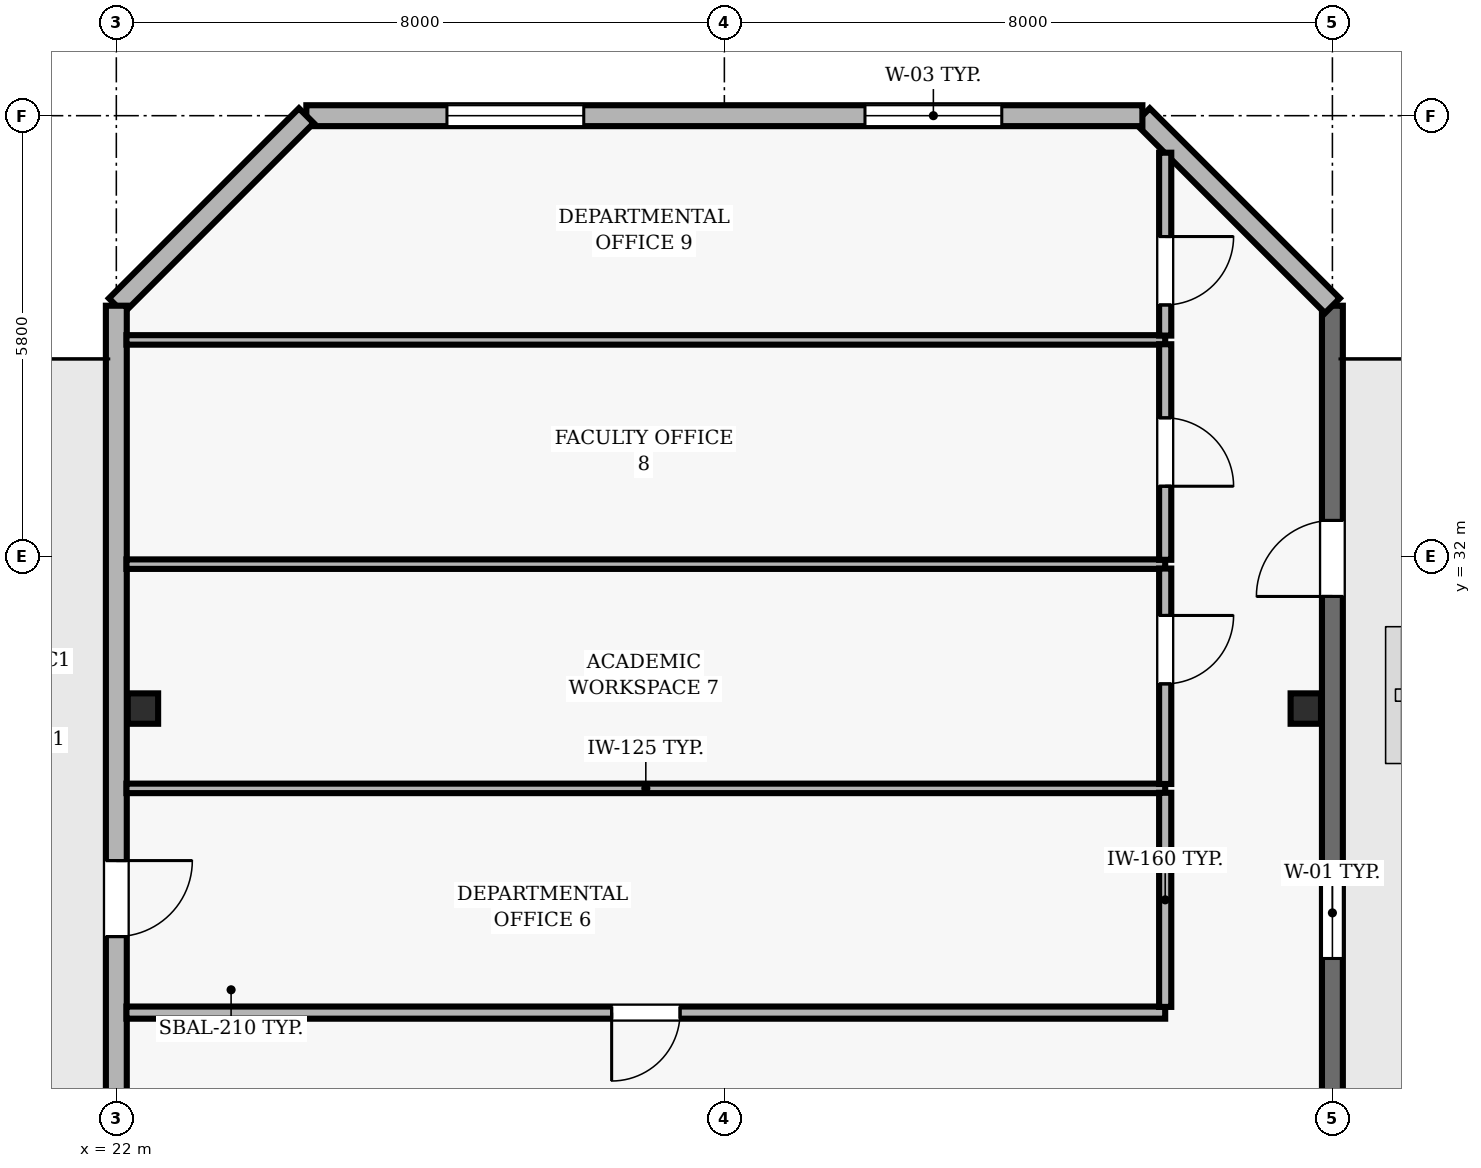
"""IFC4 building model, lengths in metres.
Left out: names, types, materials, properties, quantities, classifications, styles, units other than length and angle.
Written with IfcOpenShell. Run it as: python <this file> out.ifc"""

import sys

from ifc_helpers import new_model, si_unit, direction, frame, frame_2d, origin, origin_2d, place, context, subcontext, project, spatial, rectangle, hollow_rectangle, extrude, element, fill, save


model = new_model("IFC4")
c1 = context("Model", 3, precision=1e-05, world=origin(), true_north=direction((0.0, 1.0)))
c2 = subcontext(c1, "Body", "Model", "MODEL_VIEW")
j1 = project(units=[si_unit("LENGTHUNIT", "METRE"), si_unit("PLANEANGLEUNIT", "RADIAN")], contexts=[c1])
p1 = place(None, origin())
s1 = spatial("IfcSite", under=j1, at=p1, CompositionType="ELEMENT")
p2 = place(p1, origin())
s2 = spatial("IfcBuilding", under=s1, at=p2, CompositionType="ELEMENT")
p3 = place(p2, frame((0.0, 0.0, 263.8)))
s3 = spatial("IfcBuildingStorey", under=s2, at=p3, CompositionType="ELEMENT", Elevation=263.8)
for number, where, z_axis, x_axis in (
    (1, (22.35, 30.0, 0.0), (0.0, 0.0, 1.0), (1.0, 0.0, 0.0)),
    (2, (37.65, 30.0, 0.0), (0.0, 0.0, 1.0), (1.0, 0.0, 0.0)),
):
    element("IfcColumn", number, at=place(p3, frame(where, z_axis=z_axis, x_axis=x_axis)), inside=s3, PredefinedType="COLUMN", context=c2, shape_type="SweptSolid", body=[
        extrude(hollow_rectangle(XDim=0.4, YDim=0.4, WallThickness=0.02, at=origin_2d()), origin(), (0.0, 0.0, 1.0), 3.9),
    ])
p4 = place(p3, frame((38.0, 24.05, 0.0), z_axis=(0.0, 0.0, 1.0), x_axis=(0.0, 1.0, 0.0)))
e3 = element("IfcWall", 3, at=p4, inside=s3, PredefinedType="SOLIDWALL", context=c2, shape_type="SweptSolid", body=[
    extrude(rectangle(XDim=11.25, YDim=0.275, at=frame_2d((5.625, 0.0))), origin(), (0.0, 0.0, 1.0), 3.69),
])
p5 = place(p4, frame((7.425, 0.0, 0.0)))
e4 = element("IfcOpeningElement", 4, at=p5, cuts=e3, PredefinedType="OPENING", context=c2, shape_type="SweptSolid", body=[
    extrude(rectangle(XDim=1.0, YDim=2.2, at=frame_2d((0.5, 1.1))), frame((0.0, 0.147, 0.0), z_axis=(0.0, -1.0, 0.0), x_axis=(1.0, 0.0, 0.0)), (0.0, 0.0, 1.0), 0.295),
])
p6 = place(p4, frame((2.662, 0.0, 0.9)))
e5 = element("IfcOpeningElement", 5, at=p6, cuts=e3, PredefinedType="OPENING", context=c2, shape_type="SweptSolid", body=[
    extrude(rectangle(XDim=1.2, YDim=1.6, at=frame_2d((0.6, 0.8))), frame((0.0, 0.147, 0.0), z_axis=(0.0, -1.0, 0.0), x_axis=(1.0, 0.0, 0.0)), (0.0, 0.0, 1.0), 0.295),
])
p7 = place(p3, frame((38.0, 35.3, 0.0), z_axis=(0.0, 0.0, 1.0), x_axis=(-0.707106781187, 0.707106781187, 0.0)))
e6 = element("IfcWall", 6, at=p7, inside=s3, PredefinedType="SOLIDWALL", context=c2, shape_type="SweptSolid", body=[
    extrude(rectangle(XDim=3.536, YDim=0.275, at=frame_2d((1.768, 0.0))), origin(), (0.0, 0.0, 1.0), 3.69),
])
p8 = place(p3, frame((35.5, 37.8, 0.0), z_axis=(0.0, 0.0, 1.0), x_axis=(-1.0, 0.0, 0.0)))
e7 = element("IfcWall", 7, at=p8, inside=s3, PredefinedType="SOLIDWALL", context=c2, shape_type="SweptSolid", body=[
    extrude(rectangle(XDim=11.0, YDim=0.275, at=frame_2d((5.5, 0.0))), origin(), (0.0, 0.0, 1.0), 3.69),
])
p9 = place(p8, frame((1.85, 0.0, 0.9)))
e8 = element("IfcOpeningElement", 8, at=p9, cuts=e7, PredefinedType="OPENING", context=c2, shape_type="SweptSolid", body=[
    extrude(rectangle(XDim=1.8, YDim=1.6, at=frame_2d((0.9, 0.8))), frame((0.0, 0.147, 0.0), z_axis=(0.0, -1.0, 0.0), x_axis=(1.0, 0.0, 0.0)), (0.0, 0.0, 1.0), 0.295),
])
p10 = place(p8, frame((7.35, 0.0, 0.9)))
e9 = element("IfcOpeningElement", 9, at=p10, cuts=e7, PredefinedType="OPENING", context=c2, shape_type="SweptSolid", body=[
    extrude(rectangle(XDim=1.8, YDim=1.6, at=frame_2d((0.9, 0.8))), frame((0.0, 0.147, 0.0), z_axis=(0.0, -1.0, 0.0), x_axis=(1.0, 0.0, 0.0)), (0.0, 0.0, 1.0), 0.295),
])
p11 = place(p3, frame((24.5, 37.8, 0.0), z_axis=(0.0, 0.0, 1.0), x_axis=(-0.707106781187, -0.707106781187, 0.0)))
e10 = element("IfcWall", 10, at=p11, inside=s3, PredefinedType="SOLIDWALL", context=c2, shape_type="SweptSolid", body=[
    extrude(rectangle(XDim=3.536, YDim=0.275, at=frame_2d((1.768, 0.0))), origin(), (0.0, 0.0, 1.0), 3.69),
])
p12 = place(p3, frame((22.0, 35.3, 0.0), z_axis=(0.0, 0.0, 1.0), x_axis=(0.0, -1.0, 0.0)))
e11 = element("IfcWall", 11, at=p12, inside=s3, PredefinedType="SOLIDWALL", context=c2, shape_type="SweptSolid", body=[
    extrude(rectangle(XDim=32.8, YDim=0.275, at=frame_2d((16.4, 0.0))), origin(), (0.0, 0.0, 1.0), 3.69),
])
p13 = place(p12, frame((7.3, 0.0, 0.0)))
e12 = element("IfcOpeningElement", 12, at=p13, cuts=e11, PredefinedType="OPENING", context=c2, shape_type="SweptSolid", body=[
    extrude(rectangle(XDim=1.0, YDim=2.2, at=frame_2d((0.5, 1.1))), frame((0.0, 0.147, 0.0), z_axis=(0.0, -1.0, 0.0), x_axis=(1.0, 0.0, 0.0)), (0.0, 0.0, 1.0), 0.295),
])
p14 = place(p12, frame((12.917, 0.0, 0.9)))
e13 = element("IfcOpeningElement", 13, at=p14, cuts=e11, PredefinedType="OPENING", context=c2, shape_type="SweptSolid", body=[
    extrude(rectangle(XDim=2.4, YDim=1.6, at=frame_2d((1.2, 0.8))), frame((0.0, 0.147, 0.0), z_axis=(0.0, -1.0, 0.0), x_axis=(1.0, 0.0, 0.0)), (0.0, 0.0, 1.0), 0.295),
])
p15 = place(p12, frame((17.483, 0.0, 0.9)))
e14 = element("IfcOpeningElement", 14, at=p15, cuts=e11, PredefinedType="OPENING", context=c2, shape_type="SweptSolid", body=[
    extrude(rectangle(XDim=2.4, YDim=1.6, at=frame_2d((1.2, 0.8))), frame((0.0, 0.147, 0.0), z_axis=(0.0, -1.0, 0.0), x_axis=(1.0, 0.0, 0.0)), (0.0, 0.0, 1.0), 0.295),
])
p16 = place(p12, frame((23.4, 0.0, 0.9)))
e15 = element("IfcOpeningElement", 15, at=p16, cuts=e11, PredefinedType="OPENING", context=c2, shape_type="SweptSolid", body=[
    extrude(rectangle(XDim=2.4, YDim=1.6, at=frame_2d((1.2, 0.8))), frame((0.0, 0.147, 0.0), z_axis=(0.0, -1.0, 0.0), x_axis=(1.0, 0.0, 0.0)), (0.0, 0.0, 1.0), 0.295),
])
p17 = place(p3, frame((35.8, 26.0, 0.0), z_axis=(0.0, 0.0, 1.0), x_axis=(-1.0, 0.0, 0.0)))
e16 = element("IfcWall", 16, at=p17, inside=s3, PredefinedType="PARTITIONING", context=c2, shape_type="SweptSolid", body=[
    extrude(rectangle(XDim=13.667, YDim=0.16, at=frame_2d((6.833, 0.0))), origin(), (0.0, 0.0, 1.0), 3.69),
])
p18 = place(p17, frame((6.383, 0.0, 0.0)))
e17 = element("IfcOpeningElement", 17, at=p18, cuts=e16, PredefinedType="OPENING", context=c2, shape_type="SweptSolid", body=[
    extrude(rectangle(XDim=0.9, YDim=2.1, at=frame_2d((0.45, 1.05))), frame((0.0, 0.09, 0.0), z_axis=(0.0, -1.0, 0.0), x_axis=(1.0, 0.0, 0.0)), (0.0, 0.0, 1.0), 0.18),
])
for number, where, z_axis, x_axis in (
    (18, (35.8, 28.95, 0.0), (0.0, 0.0, 1.0), (-1.0, 0.0, 0.0)),
    (19, (35.8, 31.9, 0.0), (0.0, 0.0, 1.0), (-1.0, 0.0, 0.0)),
    (20, (35.8, 34.85, 0.0), (0.0, 0.0, 1.0), (-1.0, 0.0, 0.0)),
):
    element("IfcWall", number, at=place(p3, frame(where, z_axis=z_axis, x_axis=x_axis)), inside=s3, PredefinedType="PARTITIONING", context=c2, shape_type="SweptSolid", body=[
        extrude(rectangle(XDim=13.667, YDim=0.125, at=frame_2d((6.833, 0.0))), origin(), (0.0, 0.0, 1.0), 3.69),
    ])
p19 = place(p3, frame((35.8, 28.892, 0.0), z_axis=(0.0, 0.0, 1.0), x_axis=(0.0, -1.0, 0.0)))
e21 = element("IfcWall", 21, at=p19, inside=s3, PredefinedType="PARTITIONING", context=c2, shape_type="SweptSolid", body=[
    extrude(rectangle(XDim=2.817, YDim=0.16, at=frame_2d((1.409, 0.0))), origin(), (0.0, 0.0, 1.0), 3.69),
])
p20 = place(p3, frame((35.8, 31.842, 0.0), z_axis=(0.0, 0.0, 1.0), x_axis=(0.0, -1.0, 0.0)))
e22 = element("IfcWall", 22, at=p20, inside=s3, PredefinedType="PARTITIONING", context=c2, shape_type="SweptSolid", body=[
    extrude(rectangle(XDim=2.834, YDim=0.16, at=frame_2d((1.417, 0.0))), origin(), (0.0, 0.0, 1.0), 3.69),
])
p21 = place(p20, frame((0.617, 0.0, 0.0)))
e23 = element("IfcOpeningElement", 23, at=p21, cuts=e22, PredefinedType="OPENING", context=c2, shape_type="SweptSolid", body=[
    extrude(rectangle(XDim=0.9, YDim=2.1, at=frame_2d((0.45, 1.05))), frame((0.0, 0.09, 0.0), z_axis=(0.0, -1.0, 0.0), x_axis=(1.0, 0.0, 0.0)), (0.0, 0.0, 1.0), 0.18),
])
p22 = place(p3, frame((35.8, 34.793, 0.0), z_axis=(0.0, 0.0, 1.0), x_axis=(0.0, -1.0, 0.0)))
e24 = element("IfcWall", 24, at=p22, inside=s3, PredefinedType="PARTITIONING", context=c2, shape_type="SweptSolid", body=[
    extrude(rectangle(XDim=2.836, YDim=0.16, at=frame_2d((1.418, 0.0))), origin(), (0.0, 0.0, 1.0), 3.69),
])
p23 = place(p22, frame((0.968, 0.0, 0.0)))
e25 = element("IfcOpeningElement", 25, at=p23, cuts=e24, PredefinedType="OPENING", context=c2, shape_type="SweptSolid", body=[
    extrude(rectangle(XDim=0.9, YDim=2.1, at=frame_2d((0.45, 1.05))), frame((0.0, 0.09, 0.0), z_axis=(0.0, -1.0, 0.0), x_axis=(1.0, 0.0, 0.0)), (0.0, 0.0, 1.0), 0.18),
])
p24 = place(p3, frame((35.8, 37.313, 0.0), z_axis=(0.0, 0.0, 1.0), x_axis=(0.0, -1.0, 0.0)))
e26 = element("IfcWall", 26, at=p24, inside=s3, PredefinedType="PARTITIONING", context=c2, shape_type="SweptSolid", body=[
    extrude(rectangle(XDim=2.406, YDim=0.16, at=frame_2d((1.203, 0.0))), origin(), (0.0, 0.0, 1.0), 3.69),
])
p25 = place(p24, frame((1.103, 0.0, 0.0)))
e27 = element("IfcOpeningElement", 27, at=p25, cuts=e26, PredefinedType="OPENING", context=c2, shape_type="SweptSolid", body=[
    extrude(rectangle(XDim=0.9, YDim=2.1, at=frame_2d((0.45, 1.05))), frame((0.0, 0.09, 0.0), z_axis=(0.0, -1.0, 0.0), x_axis=(1.0, 0.0, 0.0)), (0.0, 0.0, 1.0), 0.18),
])
p26 = place(p5, origin())
e28 = element("IfcDoor", 28, at=p26, inside=s3, OperationType="SINGLE_SWING_LEFT", PredefinedType="DOOR", context=c2, shape_type="SweptSolid", body=[
    extrude(rectangle(XDim=1.0, YDim=2.2, at=frame_2d((0.5, 1.1))), frame((0.0, 0.025, 0.0), z_axis=(0.0, -1.0, 0.0), x_axis=(1.0, 0.0, 0.0)), (0.0, 0.0, 1.0), 0.05),
])
fill(e4, e28)
p27 = place(p6, origin())
e29 = element("IfcWindow", 29, at=p27, inside=s3, PartitioningType="SINGLE_PANEL", PredefinedType="WINDOW", context=c2, shape_type="SweptSolid", body=[
    extrude(rectangle(XDim=1.2, YDim=1.6, at=frame_2d((0.6, 0.8))), frame((0.0, 0.03, 0.0), z_axis=(0.0, -1.0, 0.0), x_axis=(1.0, 0.0, 0.0)), (0.0, 0.0, 1.0), 0.06),
])
fill(e5, e29)
p28 = place(p9, origin())
e30 = element("IfcWindow", 30, at=p28, inside=s3, PartitioningType="SINGLE_PANEL", PredefinedType="WINDOW", context=c2, shape_type="SweptSolid", body=[
    extrude(rectangle(XDim=1.8, YDim=1.6, at=frame_2d((0.9, 0.8))), frame((0.0, 0.03, 0.0), z_axis=(0.0, -1.0, 0.0), x_axis=(1.0, 0.0, 0.0)), (0.0, 0.0, 1.0), 0.06),
])
fill(e8, e30)
p29 = place(p10, origin())
e31 = element("IfcWindow", 31, at=p29, inside=s3, PartitioningType="SINGLE_PANEL", PredefinedType="WINDOW", context=c2, shape_type="SweptSolid", body=[
    extrude(rectangle(XDim=1.8, YDim=1.6, at=frame_2d((0.9, 0.8))), frame((0.0, 0.03, 0.0), z_axis=(0.0, -1.0, 0.0), x_axis=(1.0, 0.0, 0.0)), (0.0, 0.0, 1.0), 0.06),
])
fill(e9, e31)
p30 = place(p13, origin())
e32 = element("IfcDoor", 32, at=p30, inside=s3, OperationType="SINGLE_SWING_LEFT", PredefinedType="DOOR", context=c2, shape_type="SweptSolid", body=[
    extrude(rectangle(XDim=1.0, YDim=2.2, at=frame_2d((0.5, 1.1))), frame((0.0, 0.025, 0.0), z_axis=(0.0, -1.0, 0.0), x_axis=(1.0, 0.0, 0.0)), (0.0, 0.0, 1.0), 0.05),
])
fill(e12, e32)
p31 = place(p18, origin())
e33 = element("IfcDoor", 33, at=p31, inside=s3, OperationType="SINGLE_SWING_RIGHT", PredefinedType="DOOR", context=c2, shape_type="SweptSolid", body=[
    extrude(rectangle(XDim=0.9, YDim=2.1, at=frame_2d((0.45, 1.05))), frame((0.0, 0.025, 0.0), z_axis=(0.0, -1.0, 0.0), x_axis=(1.0, 0.0, 0.0)), (0.0, 0.0, 1.0), 0.05),
])
fill(e17, e33)
p32 = place(p21, origin())
e34 = element("IfcDoor", 34, at=p32, inside=s3, OperationType="SINGLE_SWING_LEFT", PredefinedType="DOOR", context=c2, shape_type="SweptSolid", body=[
    extrude(rectangle(XDim=0.9, YDim=2.1, at=frame_2d((0.45, 1.05))), frame((0.0, 0.025, 0.0), z_axis=(0.0, -1.0, 0.0), x_axis=(1.0, 0.0, 0.0)), (0.0, 0.0, 1.0), 0.05),
])
fill(e23, e34)
p33 = place(p23, origin())
e35 = element("IfcDoor", 35, at=p33, inside=s3, OperationType="SINGLE_SWING_RIGHT", PredefinedType="DOOR", context=c2, shape_type="SweptSolid", body=[
    extrude(rectangle(XDim=0.9, YDim=2.1, at=frame_2d((0.45, 1.05))), frame((0.0, 0.025, 0.0), z_axis=(0.0, -1.0, 0.0), x_axis=(1.0, 0.0, 0.0)), (0.0, 0.0, 1.0), 0.05),
])
fill(e25, e35)
p34 = place(p25, origin())
e36 = element("IfcDoor", 36, at=p34, inside=s3, OperationType="SINGLE_SWING_LEFT", PredefinedType="DOOR", context=c2, shape_type="SweptSolid", body=[
    extrude(rectangle(XDim=0.9, YDim=2.1, at=frame_2d((0.45, 1.05))), frame((0.0, 0.025, 0.0), z_axis=(0.0, -1.0, 0.0), x_axis=(1.0, 0.0, 0.0)), (0.0, 0.0, 1.0), 0.05),
])
fill(e27, e36)
save(model, sys.argv[1])
